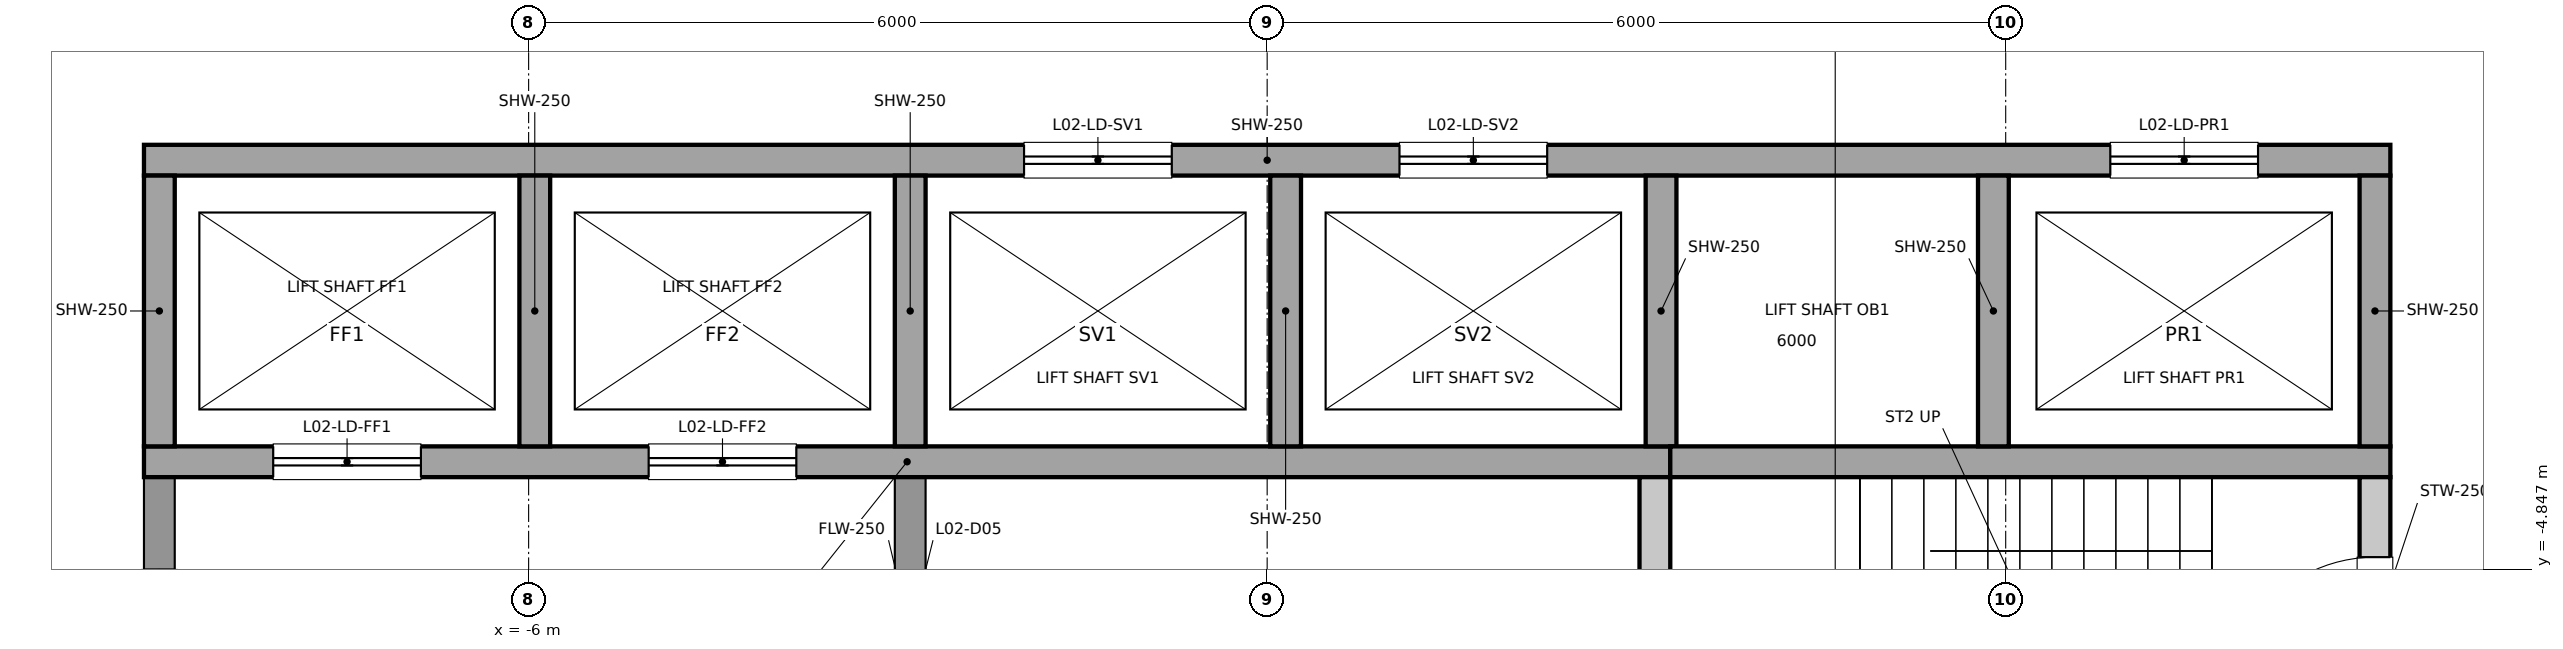
"""IFC4 building model, lengths in metres.
Left out: names, types, materials, properties, quantities, classifications, styles, units other than length and angle.
Written with IfcOpenShell. Run it as: python <this file> out.ifc"""

import sys

from ifc_helpers import new_model, si_unit, direction, frame, frame_2d, origin, place, context, subcontext, project, spatial, rectangle, extrude, element, fill, save


model = new_model("IFC4")
c1 = context("Model", 3, precision=1e-05, world=origin(), true_north=direction((0.0, 1.0)))
c2 = subcontext(c1, "Body", "Model", "MODEL_VIEW")
j1 = project(units=[si_unit("LENGTHUNIT", "METRE"), si_unit("PLANEANGLEUNIT", "RADIAN")], contexts=[c1])
p1 = place(None, origin())
s1 = spatial("IfcSite", under=j1, at=p1, CompositionType="ELEMENT")
p2 = place(p1, origin())
s2 = spatial("IfcBuilding", under=s1, at=p2, CompositionType="ELEMENT")
p3 = place(p2, frame((0.0, 0.0, 17.0)))
s3 = spatial("IfcBuildingStorey", under=s2, at=p3, CompositionType="ELEMENT", Elevation=17.0)
p4 = place(p3, frame((9.0, -6.6, 0.0), z_axis=(0.0, 0.0, 1.0), x_axis=(0.0, 1.0, 0.0)))
e1 = element("IfcWall", 1, at=p4, inside=s3, PredefinedType="SOLIDWALL", context=c2, shape_type="SweptSolid", body=[
    extrude(rectangle(XDim=2.5, YDim=0.25, at=frame_2d((1.25, 0.0))), origin(), (0.0, 0.0, 1.0), 8.8),
])
p5 = place(p4, frame((0.65, 0.0, 0.0)))
e2 = element("IfcOpeningElement", 2, at=p5, cuts=e1, PredefinedType="OPENING", context=c2, shape_type="SweptSolid", body=[
    extrude(rectangle(XDim=1.2, YDim=2.1, at=frame_2d((0.6, 1.05))), frame((0.0, 0.125, 0.0), z_axis=(0.0, -1.0, 0.0), x_axis=(1.0, 0.0, 0.0)), (0.0, 0.0, 1.0), 0.25),
])
p6 = place(p3, frame((-9.0, -6.6, 0.0), z_axis=(0.0, 0.0, 1.0), x_axis=(0.0, 1.0, 0.0)))
e3 = element("IfcWall", 3, at=p6, inside=s3, PredefinedType="PARTITIONING", context=c2, shape_type="SweptSolid", body=[
    extrude(rectangle(XDim=2.5, YDim=0.25, at=frame_2d((1.25, 0.0))), origin(), (0.0, 0.0, 1.0), 8.8),
])
p7 = place(p6, frame((0.75, 0.0, 0.0)))
e4 = element("IfcOpeningElement", 4, at=p7, cuts=e3, PredefinedType="OPENING", context=c2, shape_type="SweptSolid", body=[
    extrude(rectangle(XDim=1.0, YDim=2.1, at=frame_2d((0.5, 1.05))), frame((0.0, 0.125, 0.0), z_axis=(0.0, -1.0, 0.0), x_axis=(1.0, 0.0, 0.0)), (0.0, 0.0, 1.0), 0.25),
])
p8 = place(p3, frame((3.15, -6.6, 0.0), z_axis=(0.0, 0.0, 1.0), x_axis=(0.0, 1.0, 0.0)))
e5 = element("IfcWall", 5, at=p8, inside=s3, PredefinedType="SOLIDWALL", context=c2, shape_type="SweptSolid", body=[
    extrude(rectangle(XDim=2.5, YDim=0.25, at=frame_2d((1.25, 0.0))), origin(), (0.0, 0.0, 1.0), 8.8),
])
p9 = place(p3, frame((-2.9, -6.6, 0.0), z_axis=(0.0, 0.0, 1.0), x_axis=(0.0, 1.0, 0.0)))
e6 = element("IfcWall", 6, at=p9, inside=s3, PredefinedType="PARTITIONING", context=c2, shape_type="SweptSolid", body=[
    extrude(rectangle(XDim=2.5, YDim=0.25, at=frame_2d((1.25, 0.0))), origin(), (0.0, 0.0, 1.0), 8.8),
])
p10 = place(p9, frame((0.8, 0.0, 0.0)))
e7 = element("IfcOpeningElement", 7, at=p10, cuts=e6, PredefinedType="OPENING", context=c2, shape_type="SweptSolid", body=[
    extrude(rectangle(XDim=0.9, YDim=2.1, at=frame_2d((0.45, 1.05))), frame((0.0, 0.125, 0.0), z_axis=(0.0, -1.0, 0.0), x_axis=(1.0, 0.0, 0.0)), (0.0, 0.0, 1.0), 0.25),
])
p11 = place(p3, frame((-9.125, -1.525, 0.0), z_axis=(0.0, 0.0, 1.0), x_axis=(1.0, 0.0, 0.0)))
e8 = element("IfcWall", 8, at=p11, inside=s3, PredefinedType="SOLIDWALL", context=c2, shape_type="SweptSolid", body=[
    extrude(rectangle(XDim=18.25, YDim=0.25, at=frame_2d((9.125, 0.0))), origin(), (0.0, 0.0, 1.0), 8.8),
])
p12 = place(p11, frame((7.15, 0.0, 0.0)))
e9 = element("IfcOpeningElement", 9, at=p12, cuts=e8, PredefinedType="OPENING", context=c2, shape_type="SweptSolid", body=[
    extrude(rectangle(XDim=1.2, YDim=2.1, at=frame_2d((0.6, 1.05))), frame((0.0, 0.125, 0.0), z_axis=(0.0, -1.0, 0.0), x_axis=(1.0, 0.0, 0.0)), (0.0, 0.0, 1.0), 0.25),
])
p13 = place(p11, frame((10.2, 0.0, 0.0)))
e10 = element("IfcOpeningElement", 10, at=p13, cuts=e8, PredefinedType="OPENING", context=c2, shape_type="SweptSolid", body=[
    extrude(rectangle(XDim=1.2, YDim=2.1, at=frame_2d((0.6, 1.05))), frame((0.0, 0.125, 0.0), z_axis=(0.0, -1.0, 0.0), x_axis=(1.0, 0.0, 0.0)), (0.0, 0.0, 1.0), 0.25),
])
p14 = place(p11, frame((15.975, 0.0, 0.0)))
e11 = element("IfcOpeningElement", 11, at=p14, cuts=e8, PredefinedType="OPENING", context=c2, shape_type="SweptSolid", body=[
    extrude(rectangle(XDim=1.2, YDim=2.1, at=frame_2d((0.6, 1.05))), frame((0.0, 0.125, 0.0), z_axis=(0.0, -1.0, 0.0), x_axis=(1.0, 0.0, 0.0)), (0.0, 0.0, 1.0), 0.25),
])
p15 = place(p3, frame((-9.125, -3.975, 0.0), z_axis=(0.0, 0.0, 1.0), x_axis=(1.0, 0.0, 0.0)))
e12 = element("IfcWall", 12, at=p15, inside=s3, PredefinedType="SOLIDWALL", context=c2, shape_type="SweptSolid", body=[
    extrude(rectangle(XDim=12.4, YDim=0.25, at=frame_2d((6.2, 0.0))), origin(), (0.0, 0.0, 1.0), 8.8),
])
p16 = place(p15, frame((1.05, 0.0, 0.0)))
e13 = element("IfcOpeningElement", 13, at=p16, cuts=e12, PredefinedType="OPENING", context=c2, shape_type="SweptSolid", body=[
    extrude(rectangle(XDim=1.2, YDim=2.1, at=frame_2d((0.6, 1.05))), frame((0.0, 0.125, 0.0), z_axis=(0.0, -1.0, 0.0), x_axis=(1.0, 0.0, 0.0)), (0.0, 0.0, 1.0), 0.25),
])
p17 = place(p15, frame((4.1, 0.0, 0.0)))
e14 = element("IfcOpeningElement", 14, at=p17, cuts=e12, PredefinedType="OPENING", context=c2, shape_type="SweptSolid", body=[
    extrude(rectangle(XDim=1.2, YDim=2.1, at=frame_2d((0.6, 1.05))), frame((0.0, 0.125, 0.0), z_axis=(0.0, -1.0, 0.0), x_axis=(1.0, 0.0, 0.0)), (0.0, 0.0, 1.0), 0.25),
])
p18 = place(p3, frame((3.275, -3.975, 0.0), z_axis=(0.0, 0.0, 1.0), x_axis=(1.0, 0.0, 0.0)))
e15 = element("IfcWall", 15, at=p18, inside=s3, PredefinedType="SOLIDWALL", context=c2, shape_type="SweptSolid", body=[
    extrude(rectangle(XDim=5.85, YDim=0.25, at=frame_2d((2.925, 0.0))), origin(), (0.0, 0.0, 1.0), 8.8),
])
for number, where, z_axis, x_axis in (
    (16, (-9.0, -3.85, 0.0), (0.0, 0.0, 1.0), (0.0, 1.0, 0.0)),
    (17, (-5.95, -3.85, 0.0), (0.0, 0.0, 1.0), (0.0, 1.0, 0.0)),
    (18, (-2.9, -3.85, 0.0), (0.0, 0.0, 1.0), (0.0, 1.0, 0.0)),
    (19, (0.15, -3.85, 0.0), (0.0, 0.0, 1.0), (0.0, 1.0, 0.0)),
    (20, (3.2, -3.85, 0.0), (0.0, 0.0, 1.0), (0.0, 1.0, 0.0)),
    (21, (5.9, -3.85, 0.0), (0.0, 0.0, 1.0), (0.0, 1.0, 0.0)),
    (22, (9.0, -3.85, 0.0), (0.0, 0.0, 1.0), (0.0, 1.0, 0.0)),
):
    element("IfcWall", number, at=place(p3, frame(where, z_axis=z_axis, x_axis=x_axis)), inside=s3, PredefinedType="SOLIDWALL", context=c2, shape_type="SweptSolid", body=[
        extrude(rectangle(XDim=2.2, YDim=0.25, at=frame_2d((1.1, 0.0))), origin(), (0.0, 0.0, 1.0), 8.8),
    ])
p19 = place(p16, origin())
e23 = element("IfcDoor", 23, at=p19, inside=s3, OperationType="DOUBLE_DOOR_SLIDING", PredefinedType="DOOR", context=c2, shape_type="SweptSolid", body=[
    extrude(rectangle(XDim=1.2, YDim=2.1, at=frame_2d((0.6, 1.05))), frame((0.0, 0.025, 0.0), z_axis=(0.0, -1.0, 0.0), x_axis=(1.0, 0.0, 0.0)), (0.0, 0.0, 1.0), 0.05),
])
fill(e13, e23)
p20 = place(p17, origin())
e24 = element("IfcDoor", 24, at=p20, inside=s3, OperationType="DOUBLE_DOOR_SLIDING", PredefinedType="DOOR", context=c2, shape_type="SweptSolid", body=[
    extrude(rectangle(XDim=1.2, YDim=2.1, at=frame_2d((0.6, 1.05))), frame((0.0, 0.025, 0.0), z_axis=(0.0, -1.0, 0.0), x_axis=(1.0, 0.0, 0.0)), (0.0, 0.0, 1.0), 0.05),
])
fill(e14, e24)
p21 = place(p12, origin())
e25 = element("IfcDoor", 25, at=p21, inside=s3, OperationType="DOUBLE_DOOR_SLIDING", PredefinedType="DOOR", context=c2, shape_type="SweptSolid", body=[
    extrude(rectangle(XDim=1.2, YDim=2.1, at=frame_2d((0.6, 1.05))), frame((0.0, 0.025, 0.0), z_axis=(0.0, -1.0, 0.0), x_axis=(1.0, 0.0, 0.0)), (0.0, 0.0, 1.0), 0.05),
])
fill(e9, e25)
p22 = place(p13, origin())
e26 = element("IfcDoor", 26, at=p22, inside=s3, OperationType="DOUBLE_DOOR_SLIDING", PredefinedType="DOOR", context=c2, shape_type="SweptSolid", body=[
    extrude(rectangle(XDim=1.2, YDim=2.1, at=frame_2d((0.6, 1.05))), frame((0.0, 0.025, 0.0), z_axis=(0.0, -1.0, 0.0), x_axis=(1.0, 0.0, 0.0)), (0.0, 0.0, 1.0), 0.05),
])
fill(e10, e26)
p23 = place(p14, origin())
e27 = element("IfcDoor", 27, at=p23, inside=s3, OperationType="DOUBLE_DOOR_SLIDING", PredefinedType="DOOR", context=c2, shape_type="SweptSolid", body=[
    extrude(rectangle(XDim=1.2, YDim=2.1, at=frame_2d((0.6, 1.05))), frame((0.0, 0.025, 0.0), z_axis=(0.0, -1.0, 0.0), x_axis=(1.0, 0.0, 0.0)), (0.0, 0.0, 1.0), 0.05),
])
fill(e11, e27)
p24 = place(p5, origin())
e28 = element("IfcDoor", 28, at=p24, inside=s3, OperationType="SINGLE_SWING_LEFT", PredefinedType="DOOR", context=c2, shape_type="SweptSolid", body=[
    extrude(rectangle(XDim=1.2, YDim=2.1, at=frame_2d((0.6, 1.05))), frame((0.0, 0.025, 0.0), z_axis=(0.0, -1.0, 0.0), x_axis=(1.0, 0.0, 0.0)), (0.0, 0.0, 1.0), 0.05),
])
fill(e2, e28)
save(model, sys.argv[1])
